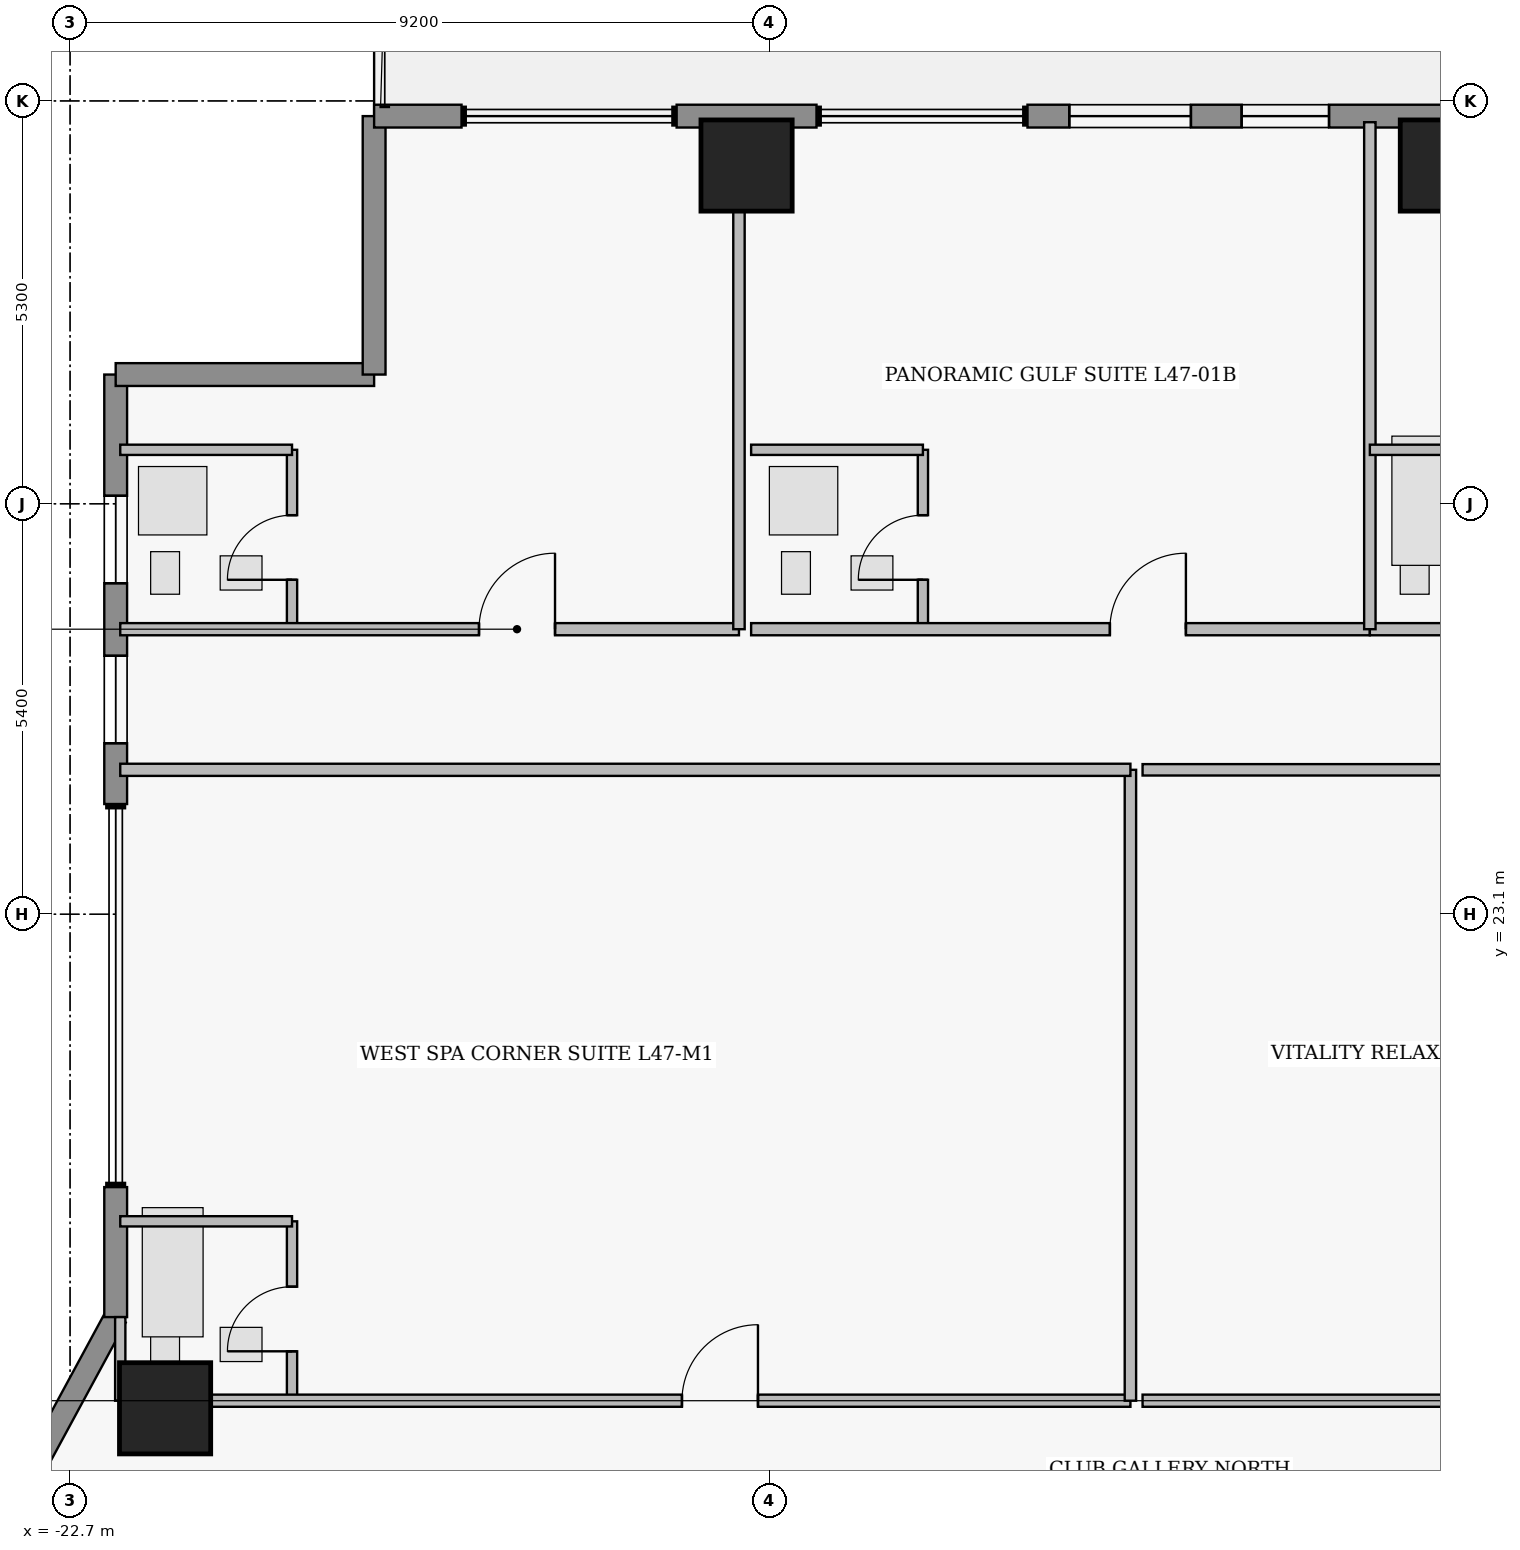
"""IFC4 building model, lengths in metres.
Left out: names, types, materials, properties, quantities, classifications, styles, units other than length and angle.
Written with IfcOpenShell. Run it as: python <this file> out.ifc"""

import sys

from ifc_helpers import new_model, si_unit, direction, frame, frame_2d, origin, origin_2d, place, context, subcontext, project, spatial, rectangle, extrude, element, fill, save


model = new_model("IFC4")
c1 = context("Model", 3, precision=1e-05, world=origin(), true_north=direction((0.0, 1.0)))
c2 = subcontext(c1, "Body", "Model", "MODEL_VIEW")
j1 = project(units=[si_unit("LENGTHUNIT", "METRE"), si_unit("PLANEANGLEUNIT", "RADIAN")], contexts=[c1])
p1 = place(None, origin())
s1 = spatial("IfcSite", under=j1, at=p1, CompositionType="ELEMENT")
p2 = place(p1, origin())
s2 = spatial("IfcBuilding", under=s1, at=p2, CompositionType="ELEMENT")
p3 = place(p2, frame((0.0, 0.0, 188.65)))
s3 = spatial("IfcBuildingStorey", under=s2, at=p3, CompositionType="ELEMENT", Elevation=188.65)
for number, where, z_axis, x_axis in (
    (1, (-13.8, 32.95, 0.0), (0.0, 0.0, 1.0), (1.0, 0.0, 0.0)),
    (2, (-4.6, 32.95, 0.0), (0.0, 0.0, 1.0), (1.0, 0.0, 0.0)),
    (3, (-21.45, 16.6, 0.0), (0.0, 0.0, 1.0), (1.0, 0.0, 0.0)),
):
    element("IfcColumn", number, at=place(p3, frame(where, z_axis=z_axis, x_axis=x_axis)), inside=s3, PredefinedType="COLUMN", context=c2, shape_type="SweptSolid", body=[
        extrude(rectangle(XDim=1.2, YDim=1.2, at=origin_2d()), origin(), (0.0, 0.0, 1.0), 3.75),
    ])
p4 = place(p3, frame((-24.7, 13.0, 0.0), z_axis=(0.0, 0.0, 1.0), x_axis=(0.476258655584, 0.879305233114, 0.0)))
e4 = element("IfcWall", 4, at=p4, inside=s3, PredefinedType="STANDARD", context=c2, shape_type="SweptSolid", body=[
    extrude(rectangle(XDim=5.459, YDim=0.3, at=frame_2d((2.729, 0.0))), origin(), (0.0, 0.0, 1.0), 3.53),
])
p5 = place(p3, frame((-22.1, 17.8, 0.0), z_axis=(0.0, 0.0, 1.0), x_axis=(0.0, 1.0, 0.0)))
e5 = element("IfcWall", 5, at=p5, inside=s3, PredefinedType="STANDARD", context=c2, shape_type="SweptSolid", body=[
    extrude(rectangle(XDim=1.71, YDim=0.3, at=frame_2d((0.855, 0.0))), origin(), (0.0, 0.0, 1.0), 3.53),
])
p6 = place(p3, frame((-22.1, 24.55, 0.0), z_axis=(0.0, 0.0, 1.0), x_axis=(0.0, 1.0, 0.0)))
e6 = element("IfcWall", 6, at=p6, inside=s3, PredefinedType="STANDARD", context=c2, shape_type="SweptSolid", body=[
    extrude(rectangle(XDim=5.65, YDim=0.3, at=frame_2d((2.825, 0.0))), origin(), (0.0, 0.0, 1.0), 3.53),
])
p7 = place(p6, frame((0.8, 0.0, 0.95)))
e7 = element("IfcOpeningElement", 7, at=p7, cuts=e6, PredefinedType="OPENING", context=c2, shape_type="SweptSolid", body=[
    extrude(rectangle(XDim=1.15, YDim=1.55, at=frame_2d((0.575, 0.775))), frame((0.0, 0.16, 0.0), z_axis=(0.0, -1.0, 0.0), x_axis=(1.0, 0.0, 0.0)), (0.0, 0.0, 1.0), 0.32),
])
p8 = place(p6, frame((2.905, 0.0, 0.95)))
e8 = element("IfcOpeningElement", 8, at=p8, cuts=e6, PredefinedType="OPENING", context=c2, shape_type="SweptSolid", body=[
    extrude(rectangle(XDim=1.15, YDim=1.55, at=frame_2d((0.575, 0.775))), frame((0.0, 0.16, 0.0), z_axis=(0.0, -1.0, 0.0), x_axis=(1.0, 0.0, 0.0)), (0.0, 0.0, 1.0), 0.32),
])
for number, where, z_axis, x_axis in (
    (9, (-22.1, 30.2, 0.0), (0.0, 0.0, 1.0), (1.0, 0.0, 0.0)),
    (10, (-18.7, 30.2, 0.0), (0.0, 0.0, 1.0), (0.0, 1.0, 0.0)),
):
    element("IfcWall", number, at=place(p3, frame(where, z_axis=z_axis, x_axis=x_axis)), inside=s3, PredefinedType="STANDARD", context=c2, shape_type="SweptSolid", body=[
        extrude(rectangle(XDim=3.4, YDim=0.3, at=frame_2d((1.7, 0.0))), origin(), (0.0, 0.0, 1.0), 3.53),
    ])
p9 = place(p3, frame((-18.7, 33.6, 0.0), z_axis=(0.0, 0.0, 1.0), x_axis=(1.0, 0.0, 0.0)))
e11 = element("IfcWall", 11, at=p9, inside=s3, PredefinedType="STANDARD", context=c2, shape_type="SweptSolid", body=[
    extrude(rectangle(XDim=1.15, YDim=0.3, at=frame_2d((0.575, 0.0))), origin(), (0.0, 0.0, 1.0), 3.53),
])
p10 = place(p3, frame((-14.72, 33.6, 0.0), z_axis=(0.0, 0.0, 1.0), x_axis=(1.0, 0.0, 0.0)))
e12 = element("IfcWall", 12, at=p10, inside=s3, PredefinedType="STANDARD", context=c2, shape_type="SweptSolid", body=[
    extrude(rectangle(XDim=1.84, YDim=0.3, at=frame_2d((0.92, 0.0))), origin(), (0.0, 0.0, 1.0), 3.53),
])
p11 = place(p3, frame((-10.104, 33.6, 0.0), z_axis=(0.0, 0.0, 1.0), x_axis=(1.0, 0.0, 0.0)))
e13 = element("IfcWall", 13, at=p11, inside=s3, PredefinedType="STANDARD", context=c2, shape_type="SweptSolid", body=[
    extrude(rectangle(XDim=6.424, YDim=0.3, at=frame_2d((3.212, 0.0))), origin(), (0.0, 0.0, 1.0), 3.53),
])
p12 = place(p11, frame((0.55, 0.0, 0.85)))
e14 = element("IfcOpeningElement", 14, at=p12, cuts=e13, PredefinedType="OPENING", context=c2, shape_type="SweptSolid", body=[
    extrude(rectangle(XDim=1.6, YDim=1.8, at=frame_2d((0.8, 0.9))), frame((0.0, 0.16, 0.0), z_axis=(0.0, -1.0, 0.0), x_axis=(1.0, 0.0, 0.0)), (0.0, 0.0, 1.0), 0.32),
])
p13 = place(p11, frame((2.817, 0.0, 0.95)))
e15 = element("IfcOpeningElement", 15, at=p13, cuts=e13, PredefinedType="OPENING", context=c2, shape_type="SweptSolid", body=[
    extrude(rectangle(XDim=1.15, YDim=1.55, at=frame_2d((0.575, 0.775))), frame((0.0, 0.16, 0.0), z_axis=(0.0, -1.0, 0.0), x_axis=(1.0, 0.0, 0.0)), (0.0, 0.0, 1.0), 0.32),
])
p14 = place(p3, frame((-19.78, 26.85, 0.0), z_axis=(0.0, 0.0, 1.0), x_axis=(0.0, 1.0, 0.0)))
e16 = element("IfcWall", 16, at=p14, inside=s3, PredefinedType="PLUMBINGWALL", context=c2, shape_type="SweptSolid", body=[
    extrude(rectangle(XDim=2.36, YDim=0.135, at=frame_2d((1.18, 0.0))), origin(), (0.0, 0.0, 1.0), 3.53),
])
p15 = place(p14, frame((0.65, 0.0, 0.0)))
e17 = element("IfcOpeningElement", 17, at=p15, cuts=e16, PredefinedType="OPENING", context=c2, shape_type="SweptSolid", body=[
    extrude(rectangle(XDim=0.85, YDim=2.1, at=frame_2d((0.425, 1.05))), frame((0.0, 0.077, 0.0), z_axis=(0.0, -1.0, 0.0), x_axis=(1.0, 0.0, 0.0)), (0.0, 0.0, 1.0), 0.155),
])
p16 = place(p3, frame((-22.04, 26.85, 0.0), z_axis=(0.0, 0.0, 1.0), x_axis=(1.0, 0.0, 0.0)))
e18 = element("IfcWall", 18, at=p16, inside=s3, PredefinedType="PARTITIONING", context=c2, shape_type="SweptSolid", body=[
    extrude(rectangle(XDim=8.14, YDim=0.16, at=frame_2d((4.07, 0.0))), origin(), (0.0, 0.0, 1.0), 3.53),
])
p17 = place(p16, frame((4.72, 0.0, 0.0)))
e19 = element("IfcOpeningElement", 19, at=p17, cuts=e18, PredefinedType="OPENING", context=c2, shape_type="SweptSolid", body=[
    extrude(rectangle(XDim=1.0, YDim=2.15, at=frame_2d((0.5, 1.075))), frame((0.0, 0.09, 0.0), z_axis=(0.0, -1.0, 0.0), x_axis=(1.0, 0.0, 0.0)), (0.0, 0.0, 1.0), 0.18),
])
p18 = place(p3, frame((-11.48, 26.85, 0.0), z_axis=(0.0, 0.0, 1.0), x_axis=(0.0, 1.0, 0.0)))
e20 = element("IfcWall", 20, at=p18, inside=s3, PredefinedType="PLUMBINGWALL", context=c2, shape_type="SweptSolid", body=[
    extrude(rectangle(XDim=2.36, YDim=0.135, at=frame_2d((1.18, 0.0))), origin(), (0.0, 0.0, 1.0), 3.53),
])
p19 = place(p18, frame((0.65, 0.0, 0.0)))
e21 = element("IfcOpeningElement", 21, at=p19, cuts=e20, PredefinedType="OPENING", context=c2, shape_type="SweptSolid", body=[
    extrude(rectangle(XDim=0.85, YDim=2.1, at=frame_2d((0.425, 1.05))), frame((0.0, 0.077, 0.0), z_axis=(0.0, -1.0, 0.0), x_axis=(1.0, 0.0, 0.0)), (0.0, 0.0, 1.0), 0.155),
])
p20 = place(p3, frame((-13.74, 26.85, 0.0), z_axis=(0.0, 0.0, 1.0), x_axis=(1.0, 0.0, 0.0)))
e22 = element("IfcWall", 22, at=p20, inside=s3, PredefinedType="PARTITIONING", context=c2, shape_type="SweptSolid", body=[
    extrude(rectangle(XDim=8.14, YDim=0.16, at=frame_2d((4.07, 0.0))), origin(), (0.0, 0.0, 1.0), 3.53),
])
p21 = place(p20, frame((4.72, 0.0, 0.0)))
e23 = element("IfcOpeningElement", 23, at=p21, cuts=e22, PredefinedType="OPENING", context=c2, shape_type="SweptSolid", body=[
    extrude(rectangle(XDim=1.0, YDim=2.15, at=frame_2d((0.5, 1.075))), frame((0.0, 0.09, 0.0), z_axis=(0.0, -1.0, 0.0), x_axis=(1.0, 0.0, 0.0)), (0.0, 0.0, 1.0), 0.18),
])
p22 = place(p3, frame((-5.6, 26.85, 0.0), z_axis=(0.0, 0.0, 1.0), x_axis=(1.0, 0.0, 0.0)))
e24 = element("IfcWall", 24, at=p22, inside=s3, PredefinedType="PARTITIONING", context=c2, shape_type="SweptSolid", body=[
    extrude(rectangle(XDim=11.2, YDim=0.16, at=frame_2d((5.6, 0.0))), origin(), (0.0, 0.0, 1.0), 3.53),
])
p23 = place(p22, frame((6.25, 0.0, 0.0)))
e25 = element("IfcOpeningElement", 25, at=p23, cuts=e24, PredefinedType="OPENING", context=c2, shape_type="SweptSolid", body=[
    extrude(rectangle(XDim=1.0, YDim=2.15, at=frame_2d((0.5, 1.075))), frame((0.0, 0.09, 0.0), z_axis=(0.0, -1.0, 0.0), x_axis=(1.0, 0.0, 0.0)), (0.0, 0.0, 1.0), 0.18),
])
p24 = place(p3, frame((-19.78, 16.7, 0.0), z_axis=(0.0, 0.0, 1.0), x_axis=(0.0, 1.0, 0.0)))
e26 = element("IfcWall", 26, at=p24, inside=s3, PredefinedType="PLUMBINGWALL", context=c2, shape_type="SweptSolid", body=[
    extrude(rectangle(XDim=2.36, YDim=0.135, at=frame_2d((1.18, 0.0))), origin(), (0.0, 0.0, 1.0), 3.53),
])
p25 = place(p24, frame((0.65, 0.0, 0.0)))
e27 = element("IfcOpeningElement", 27, at=p25, cuts=e26, PredefinedType="OPENING", context=c2, shape_type="SweptSolid", body=[
    extrude(rectangle(XDim=0.85, YDim=2.1, at=frame_2d((0.425, 1.05))), frame((0.0, 0.077, 0.0), z_axis=(0.0, -1.0, 0.0), x_axis=(1.0, 0.0, 0.0)), (0.0, 0.0, 1.0), 0.155),
])
p26 = place(p3, frame((-22.04, 16.7, 0.0), z_axis=(0.0, 0.0, 1.0), x_axis=(1.0, 0.0, 0.0)))
e28 = element("IfcWall", 28, at=p26, inside=s3, PredefinedType="PARTITIONING", context=c2, shape_type="SweptSolid", body=[
    extrude(rectangle(XDim=13.29, YDim=0.16, at=frame_2d((6.645, 0.0))), origin(), (0.0, 0.0, 1.0), 3.124),
])
p27 = place(p26, frame((7.39, 0.0, 0.0)))
e29 = element("IfcOpeningElement", 29, at=p27, cuts=e28, PredefinedType="OPENING", context=c2, shape_type="SweptSolid", body=[
    extrude(rectangle(XDim=1.0, YDim=2.15, at=frame_2d((0.5, 1.075))), frame((0.0, 0.09, 0.0), z_axis=(0.0, -1.0, 0.0), x_axis=(1.0, 0.0, 0.0)), (0.0, 0.0, 1.0), 0.18),
])
p28 = place(p3, frame((-8.59, 16.7, 0.0), z_axis=(0.0, 0.0, 1.0), x_axis=(1.0, 0.0, 0.0)))
e30 = element("IfcWall", 30, at=p28, inside=s3, PredefinedType="PARTITIONING", context=c2, shape_type="SweptSolid", body=[
    extrude(rectangle(XDim=7.61, YDim=0.16, at=frame_2d((3.805, 0.0))), origin(), (0.0, 0.0, 1.0), 3.124),
])
p29 = place(p28, frame((5.8, 0.0, 0.0)))
e31 = element("IfcOpeningElement", 31, at=p29, cuts=e30, PredefinedType="OPENING", context=c2, shape_type="SweptSolid", body=[
    extrude(rectangle(XDim=1.08, YDim=2.18, at=frame_2d((0.54, 1.09))), frame((0.0, 0.09, 0.0), z_axis=(0.0, -1.0, 0.0), x_axis=(1.0, 0.0, 0.0)), (0.0, 0.0, 1.0), 0.18),
])
p30 = place(p3, frame((-22.04, 29.21, 0.0), z_axis=(0.0, 0.0, 1.0), x_axis=(1.0, 0.0, 0.0)))
e32 = element("IfcWall", 32, at=p30, inside=s3, PredefinedType="PLUMBINGWALL", context=c2, shape_type="SweptSolid", body=[
    extrude(rectangle(XDim=2.26, YDim=0.135, at=frame_2d((1.13, 0.0))), origin(), (0.0, 0.0, 1.0), 3.53),
])
p31 = place(p3, frame((-13.9, 26.85, 0.0), z_axis=(0.0, 0.0, 1.0), x_axis=(0.0, 1.0, 0.0)))
e33 = element("IfcWall", 33, at=p31, inside=s3, PredefinedType="PARTITIONING", context=c2, shape_type="SweptSolid", body=[
    extrude(rectangle(XDim=6.67, YDim=0.15, at=frame_2d((3.335, 0.0))), origin(), (0.0, 0.0, 1.0), 2.519),
])
p32 = place(p3, frame((-13.74, 29.21, 0.0), z_axis=(0.0, 0.0, 1.0), x_axis=(1.0, 0.0, 0.0)))
e34 = element("IfcWall", 34, at=p32, inside=s3, PredefinedType="PLUMBINGWALL", context=c2, shape_type="SweptSolid", body=[
    extrude(rectangle(XDim=2.26, YDim=0.135, at=frame_2d((1.13, 0.0))), origin(), (0.0, 0.0, 1.0), 3.53),
])
p33 = place(p3, frame((-5.6, 26.85, 0.0), z_axis=(0.0, 0.0, 1.0), x_axis=(0.0, 1.0, 0.0)))
e35 = element("IfcWall", 35, at=p33, inside=s3, PredefinedType="PARTITIONING", context=c2, shape_type="SweptSolid", body=[
    extrude(rectangle(XDim=6.67, YDim=0.15, at=frame_2d((3.335, 0.0))), origin(), (0.0, 0.0, 1.0), 3.53),
])
for number, where, z_axis, x_axis in (
    (36, (-5.6, 29.21, 0.0), (0.0, 0.0, 1.0), (1.0, 0.0, 0.0)),
    (37, (-22.04, 19.06, 0.0), (0.0, 0.0, 1.0), (1.0, 0.0, 0.0)),
):
    element("IfcWall", number, at=place(p3, frame(where, z_axis=z_axis, x_axis=x_axis)), inside=s3, PredefinedType="PLUMBINGWALL", context=c2, shape_type="SweptSolid", body=[
        extrude(rectangle(XDim=2.26, YDim=0.135, at=frame_2d((1.13, 0.0))), origin(), (0.0, 0.0, 1.0), 3.53),
    ])
p34 = place(p3, frame((-22.04, 16.7, 0.0), z_axis=(0.0, 0.0, 1.0), x_axis=(0.0, 1.0, 0.0)))
e38 = element("IfcWall", 38, at=p34, inside=s3, PredefinedType="PLUMBINGWALL", context=c2, shape_type="SweptSolid", body=[
    extrude(rectangle(XDim=1.1, YDim=0.135, at=frame_2d((0.55, 0.0))), origin(), (0.0, 0.0, 1.0), 3.53),
])
p35 = place(p3, frame((-8.75, 16.7, 0.0), z_axis=(0.0, 0.0, 1.0), x_axis=(0.0, 1.0, 0.0)))
e39 = element("IfcWall", 39, at=p35, inside=s3, PredefinedType="PARTITIONING", context=c2, shape_type="SweptSolid", body=[
    extrude(rectangle(XDim=8.3, YDim=0.15, at=frame_2d((4.15, 0.0))), origin(), (0.0, 0.0, 1.0), 3.53),
])
p36 = place(p3, frame((-22.04, 25.0, 0.0), z_axis=(0.0, 0.0, 1.0), x_axis=(1.0, 0.0, 0.0)))
e40 = element("IfcWall", 40, at=p36, inside=s3, PredefinedType="PARTITIONING", context=c2, shape_type="SweptSolid", body=[
    extrude(rectangle(XDim=13.29, YDim=0.16, at=frame_2d((6.645, 0.0))), origin(), (0.0, 0.0, 1.0), 3.124),
])
p37 = place(p3, frame((-8.59, 25.0, 0.0), z_axis=(0.0, 0.0, 1.0), x_axis=(1.0, 0.0, 0.0)))
e41 = element("IfcWall", 41, at=p37, inside=s3, PredefinedType="PARTITIONING", context=c2, shape_type="SweptSolid", body=[
    extrude(rectangle(XDim=7.61, YDim=0.15, at=frame_2d((3.805, 0.0))), origin(), (0.0, 0.0, 1.0), 3.124),
])
p38 = place(p7, origin())
e42 = element("IfcWindow", 42, at=p38, inside=s3, PartitioningType="SINGLE_PANEL", PredefinedType="WINDOW", context=c2, shape_type="SweptSolid", body=[
    extrude(rectangle(XDim=1.15, YDim=1.55, at=frame_2d((0.575, 0.775))), frame((0.0, 0.03, 0.0), z_axis=(0.0, -1.0, 0.0), x_axis=(1.0, 0.0, 0.0)), (0.0, 0.0, 1.0), 0.06),
])
fill(e7, e42)
p39 = place(p8, origin())
e43 = element("IfcWindow", 43, at=p39, inside=s3, PartitioningType="SINGLE_PANEL", PredefinedType="WINDOW", context=c2, shape_type="SweptSolid", body=[
    extrude(rectangle(XDim=1.15, YDim=1.55, at=frame_2d((0.575, 0.775))), frame((0.0, 0.03, 0.0), z_axis=(0.0, -1.0, 0.0), x_axis=(1.0, 0.0, 0.0)), (0.0, 0.0, 1.0), 0.06),
])
fill(e8, e43)
p40 = place(p12, origin())
e44 = element("IfcWindow", 44, at=p40, inside=s3, PartitioningType="SINGLE_PANEL", PredefinedType="WINDOW", context=c2, shape_type="SweptSolid", body=[
    extrude(rectangle(XDim=1.6, YDim=1.8, at=frame_2d((0.8, 0.9))), frame((0.0, 0.03, 0.0), z_axis=(0.0, -1.0, 0.0), x_axis=(1.0, 0.0, 0.0)), (0.0, 0.0, 1.0), 0.06),
])
fill(e14, e44)
p41 = place(p13, origin())
e45 = element("IfcWindow", 45, at=p41, inside=s3, PartitioningType="SINGLE_PANEL", PredefinedType="WINDOW", context=c2, shape_type="SweptSolid", body=[
    extrude(rectangle(XDim=1.15, YDim=1.55, at=frame_2d((0.575, 0.775))), frame((0.0, 0.03, 0.0), z_axis=(0.0, -1.0, 0.0), x_axis=(1.0, 0.0, 0.0)), (0.0, 0.0, 1.0), 0.06),
])
fill(e15, e45)
p42 = place(p15, origin())
e46 = element("IfcDoor", 46, at=p42, inside=s3, OperationType="SINGLE_SWING_LEFT", PredefinedType="DOOR", context=c2, shape_type="SweptSolid", body=[
    extrude(rectangle(XDim=0.85, YDim=2.1, at=frame_2d((0.425, 1.05))), frame((0.0, 0.025, 0.0), z_axis=(0.0, -1.0, 0.0), x_axis=(1.0, 0.0, 0.0)), (0.0, 0.0, 1.0), 0.05),
])
fill(e17, e46)
p43 = place(p17, origin())
e47 = element("IfcDoor", 47, at=p43, inside=s3, OperationType="SINGLE_SWING_RIGHT", PredefinedType="DOOR", context=c2, shape_type="SweptSolid", body=[
    extrude(rectangle(XDim=1.0, YDim=2.15, at=frame_2d((0.5, 1.075))), frame((0.0, 0.025, 0.0), z_axis=(0.0, -1.0, 0.0), x_axis=(1.0, 0.0, 0.0)), (0.0, 0.0, 1.0), 0.05),
])
fill(e19, e47)
p44 = place(p19, origin())
e48 = element("IfcDoor", 48, at=p44, inside=s3, OperationType="SINGLE_SWING_LEFT", PredefinedType="DOOR", context=c2, shape_type="SweptSolid", body=[
    extrude(rectangle(XDim=0.85, YDim=2.1, at=frame_2d((0.425, 1.05))), frame((0.0, 0.025, 0.0), z_axis=(0.0, -1.0, 0.0), x_axis=(1.0, 0.0, 0.0)), (0.0, 0.0, 1.0), 0.05),
])
fill(e21, e48)
p45 = place(p21, origin())
e49 = element("IfcDoor", 49, at=p45, inside=s3, OperationType="SINGLE_SWING_RIGHT", PredefinedType="DOOR", context=c2, shape_type="SweptSolid", body=[
    extrude(rectangle(XDim=1.0, YDim=2.15, at=frame_2d((0.5, 1.075))), frame((0.0, 0.025, 0.0), z_axis=(0.0, -1.0, 0.0), x_axis=(1.0, 0.0, 0.0)), (0.0, 0.0, 1.0), 0.05),
])
fill(e23, e49)
p46 = place(p25, origin())
e50 = element("IfcDoor", 50, at=p46, inside=s3, OperationType="SINGLE_SWING_LEFT", PredefinedType="DOOR", context=c2, shape_type="SweptSolid", body=[
    extrude(rectangle(XDim=0.85, YDim=2.1, at=frame_2d((0.425, 1.05))), frame((0.0, 0.025, 0.0), z_axis=(0.0, -1.0, 0.0), x_axis=(1.0, 0.0, 0.0)), (0.0, 0.0, 1.0), 0.05),
])
fill(e27, e50)
p47 = place(p27, origin())
e51 = element("IfcDoor", 51, at=p47, inside=s3, OperationType="SINGLE_SWING_RIGHT", PredefinedType="DOOR", context=c2, shape_type="SweptSolid", body=[
    extrude(rectangle(XDim=1.0, YDim=2.15, at=frame_2d((0.5, 1.075))), frame((0.0, 0.025, 0.0), z_axis=(0.0, -1.0, 0.0), x_axis=(1.0, 0.0, 0.0)), (0.0, 0.0, 1.0), 0.05),
])
fill(e29, e51)
save(model, sys.argv[1])
